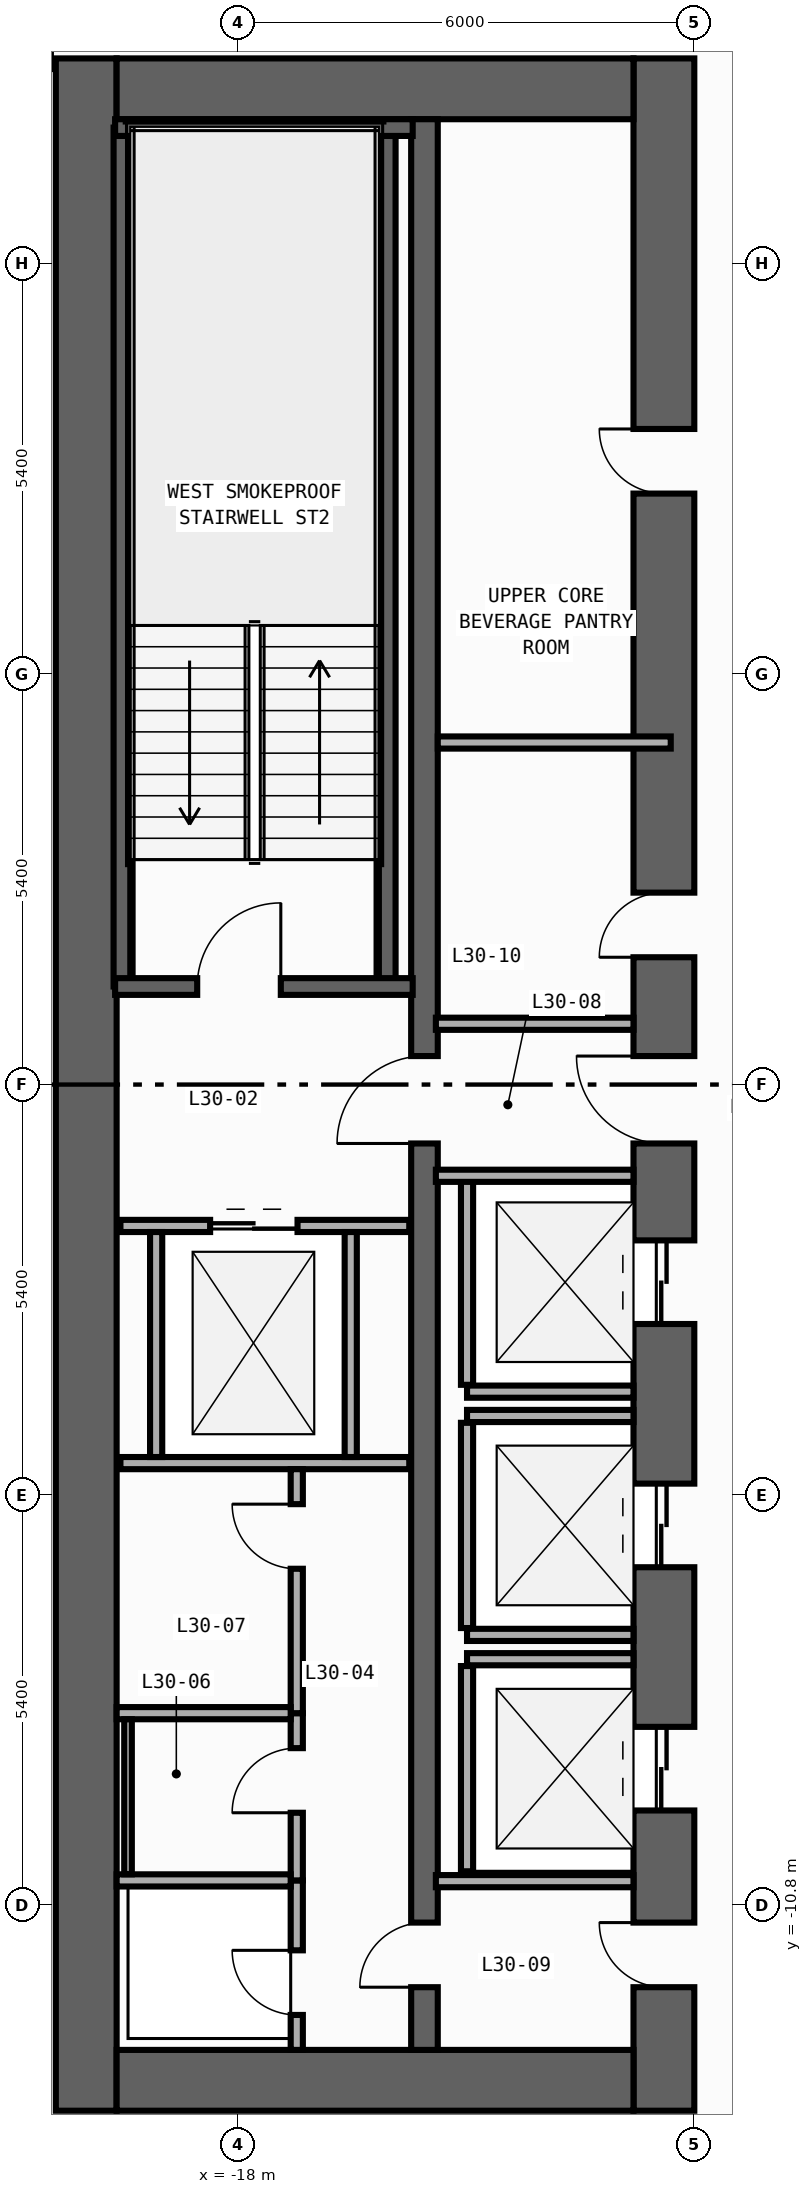
"""IFC4 building model, lengths in metres.
Left out: names, types, materials, properties, quantities, classifications, styles, units other than length and angle.
Written with IfcOpenShell. Run it as: python <this file> out.ifc"""

import sys

from ifc_helpers import new_model, si_unit, direction, frame, frame_2d, origin, place, context, subcontext, project, spatial, rectangle, extrude, element, fill, save


model = new_model("IFC4")
c1 = context("Model", 3, precision=1e-05, world=origin(), true_north=direction((0.0, 1.0)))
c2 = subcontext(c1, "Body", "Model", "MODEL_VIEW")
j1 = project(units=[si_unit("LENGTHUNIT", "METRE"), si_unit("PLANEANGLEUNIT", "RADIAN")], contexts=[c1])
p1 = place(None, origin())
s1 = spatial("IfcSite", under=j1, at=p1, CompositionType="ELEMENT")
p2 = place(p1, origin())
s2 = spatial("IfcBuilding", under=s1, at=p2, CompositionType="ELEMENT")
p3 = place(p2, frame((0.0, 0.0, 131.0)))
s3 = spatial("IfcBuildingStorey", under=s2, at=p3, CompositionType="ELEMENT", Elevation=131.0)
p4 = place(p3, frame((-20.0, -13.5, 0.0), z_axis=(0.0, 0.0, 1.0), x_axis=(0.0, 1.0, 0.0)))
e1 = element("IfcWall", 1, at=p4, inside=s3, PredefinedType="SHEAR", context=c2, shape_type="SweptSolid", body=[
    extrude(rectangle(XDim=27.0, YDim=0.8, at=frame_2d((13.5, 0.0))), origin(), (0.0, 0.0, 1.0), 3.94),
])
p5 = place(p3, frame((-12.4, -13.5, 0.0), z_axis=(0.0, 0.0, 1.0), x_axis=(0.0, 1.0, 0.0)))
e2 = element("IfcWall", 2, at=p5, inside=s3, PredefinedType="SHEAR", context=c2, shape_type="SweptSolid", body=[
    extrude(rectangle(XDim=27.0, YDim=0.8, at=frame_2d((13.5, 0.0))), origin(), (0.0, 0.0, 1.0), 3.94),
])
p6 = place(p5, frame((10.35, 0.0, 0.0)))
e3 = element("IfcOpeningElement", 3, at=p6, cuts=e2, PredefinedType="OPENING", context=c2, shape_type="SweptSolid", body=[
    extrude(rectangle(XDim=1.1, YDim=2.2, at=frame_2d((0.55, 1.1))), frame((0.0, 0.41, 0.0), z_axis=(0.0, -1.0, 0.0), x_axis=(1.0, 0.0, 0.0)), (0.0, 0.0, 1.0), 0.82),
])
p7 = place(p5, frame((7.15, 0.0, 0.0)))
e4 = element("IfcOpeningElement", 4, at=p7, cuts=e2, PredefinedType="OPENING", context=c2, shape_type="SweptSolid", body=[
    extrude(rectangle(XDim=1.1, YDim=2.2, at=frame_2d((0.55, 1.1))), frame((0.0, 0.41, 0.0), z_axis=(0.0, -1.0, 0.0), x_axis=(1.0, 0.0, 0.0)), (0.0, 0.0, 1.0), 0.82),
])
p8 = place(p5, frame((3.95, 0.0, 0.0)))
e5 = element("IfcOpeningElement", 5, at=p8, cuts=e2, PredefinedType="OPENING", context=c2, shape_type="SweptSolid", body=[
    extrude(rectangle(XDim=1.1, YDim=2.2, at=frame_2d((0.55, 1.1))), frame((0.0, 0.41, 0.0), z_axis=(0.0, -1.0, 0.0), x_axis=(1.0, 0.0, 0.0)), (0.0, 0.0, 1.0), 0.82),
])
p9 = place(p5, frame((15.175, 0.0, 0.0)))
e6 = element("IfcOpeningElement", 6, at=p9, cuts=e2, PredefinedType="OPENING", context=c2, shape_type="SweptSolid", body=[
    extrude(rectangle(XDim=0.85, YDim=2.1, at=frame_2d((0.425, 1.05))), frame((0.0, 0.41, 0.0), z_axis=(0.0, -1.0, 0.0), x_axis=(1.0, 0.0, 0.0)), (0.0, 0.0, 1.0), 0.82),
])
p10 = place(p5, frame((21.275, 0.0, 0.0)))
e7 = element("IfcOpeningElement", 7, at=p10, cuts=e2, PredefinedType="OPENING", context=c2, shape_type="SweptSolid", body=[
    extrude(rectangle(XDim=0.85, YDim=2.1, at=frame_2d((0.425, 1.05))), frame((0.0, 0.41, 0.0), z_axis=(0.0, -1.0, 0.0), x_axis=(1.0, 0.0, 0.0)), (0.0, 0.0, 1.0), 0.82),
])
p11 = place(p5, frame((12.725, 0.0, 0.0)))
e8 = element("IfcOpeningElement", 8, at=p11, cuts=e2, PredefinedType="OPENING", context=c2, shape_type="SweptSolid", body=[
    extrude(rectangle(XDim=1.15, YDim=2.2, at=frame_2d((0.575, 1.1))), frame((0.0, 0.41, 0.0), z_axis=(0.0, -1.0, 0.0), x_axis=(1.0, 0.0, 0.0)), (0.0, 0.0, 1.0), 0.82),
])
p12 = place(p5, frame((1.625, 0.0, 0.0)))
e9 = element("IfcOpeningElement", 9, at=p12, cuts=e2, PredefinedType="OPENING", context=c2, shape_type="SweptSolid", body=[
    extrude(rectangle(XDim=0.85, YDim=2.1, at=frame_2d((0.425, 1.05))), frame((0.0, 0.41, 0.0), z_axis=(0.0, -1.0, 0.0), x_axis=(1.0, 0.0, 0.0)), (0.0, 0.0, 1.0), 0.82),
])
for number, where, z_axis, x_axis in (
    (10, (-19.6, -13.1, 0.0), (0.0, 0.0, 1.0), (1.0, 0.0, 0.0)),
    (11, (-19.6, 13.1, 0.0), (0.0, 0.0, 1.0), (1.0, 0.0, 0.0)),
):
    element("IfcWall", number, at=place(p3, frame(where, z_axis=z_axis, x_axis=x_axis)), inside=s3, PredefinedType="SHEAR", context=c2, shape_type="SweptSolid", body=[
        extrude(rectangle(XDim=6.8, YDim=0.8, at=frame_2d((3.4, 0.0))), origin(), (0.0, 0.0, 1.0), 3.94),
    ])
p13 = place(p3, frame((-15.55, -12.7, 0.0), z_axis=(0.0, 0.0, 1.0), x_axis=(0.0, 1.0, 0.0)))
e12 = element("IfcWall", 12, at=p13, inside=s3, PredefinedType="SHEAR", context=c2, shape_type="SweptSolid", body=[
    extrude(rectangle(XDim=25.4, YDim=0.35, at=frame_2d((12.7, 0.0))), origin(), (0.0, 0.0, 1.0), 3.94),
])
p14 = place(p13, frame((11.925, 0.0, 0.0)))
e13 = element("IfcOpeningElement", 13, at=p14, cuts=e12, PredefinedType="OPENING", context=c2, shape_type="SweptSolid", body=[
    extrude(rectangle(XDim=1.15, YDim=2.2, at=frame_2d((0.575, 1.1))), frame((0.0, 0.185, 0.0), z_axis=(0.0, -1.0, 0.0), x_axis=(1.0, 0.0, 0.0)), (0.0, 0.0, 1.0), 0.37),
])
p15 = place(p13, frame((0.825, 0.0, 0.0)))
e14 = element("IfcOpeningElement", 14, at=p15, cuts=e12, PredefinedType="OPENING", context=c2, shape_type="SweptSolid", body=[
    extrude(rectangle(XDim=0.85, YDim=2.1, at=frame_2d((0.425, 1.05))), frame((0.0, 0.185, 0.0), z_axis=(0.0, -1.0, 0.0), x_axis=(1.0, 0.0, 0.0)), (0.0, 0.0, 1.0), 0.37),
])
for number, where, z_axis, x_axis in (
    (15, (-16.04, 1.29, 0.0), (0.0, 0.0, 1.0), (0.0, 1.0, 0.0)),
    (16, (-19.53, 1.29, 0.0), (0.0, 0.0, 1.0), (0.0, 1.0, 0.0)),
):
    element("IfcWall", number, at=place(p3, frame(where, z_axis=z_axis, x_axis=x_axis)), inside=s3, PredefinedType="SHEAR", context=c2, shape_type="SweptSolid", body=[
        extrude(rectangle(XDim=11.3, YDim=0.22, at=frame_2d((5.65, 0.0))), origin(), (0.0, 0.0, 1.0), 3.94),
    ])
p16 = place(p3, frame((-19.62, 12.59, 0.0), z_axis=(0.0, 0.0, 1.0), x_axis=(1.0, 0.0, 0.0)))
e17 = element("IfcWall", 17, at=p16, inside=s3, PredefinedType="SHEAR", context=c2, shape_type="SweptSolid", body=[
    extrude(rectangle(XDim=3.915, YDim=0.22, at=frame_2d((1.958, 0.0))), origin(), (0.0, 0.0, 1.0), 3.94),
])
p17 = place(p3, frame((-19.62, 1.29, 0.0), z_axis=(0.0, 0.0, 1.0), x_axis=(1.0, 0.0, 0.0)))
e18 = element("IfcWall", 18, at=p17, inside=s3, PredefinedType="SHEAR", context=c2, shape_type="SweptSolid", body=[
    extrude(rectangle(XDim=3.915, YDim=0.22, at=frame_2d((1.958, 0.0))), origin(), (0.0, 0.0, 1.0), 3.94),
])
p18 = place(p17, frame((1.08, 0.0, 0.0)))
e19 = element("IfcOpeningElement", 19, at=p18, cuts=e18, PredefinedType="OPENING", context=c2, shape_type="SweptSolid", body=[
    extrude(rectangle(XDim=1.1, YDim=2.2, at=frame_2d((0.55, 1.1))), frame((0.0, 0.12, 0.0), z_axis=(0.0, -1.0, 0.0), x_axis=(1.0, 0.0, 0.0)), (0.0, 0.0, 1.0), 0.24),
])
p19 = place(p3, frame((-14.99, -4.04, 0.0), z_axis=(0.0, 0.0, 1.0), x_axis=(1.0, 0.0, 0.0)))
e20 = element("IfcWall", 20, at=p19, inside=s3, PredefinedType="STANDARD", context=c2, shape_type="SweptSolid", body=[
    extrude(rectangle(XDim=2.19, YDim=0.16, at=frame_2d((1.095, 0.0))), origin(), (0.0, 0.0, 1.0), 3.94),
])
p20 = place(p3, frame((-14.99, -3.95, 0.0), z_axis=(0.0, 0.0, 1.0), x_axis=(0.0, 1.0, 0.0)))
e21 = element("IfcWall", 21, at=p20, inside=s3, PredefinedType="STANDARD", context=c2, shape_type="SweptSolid", body=[
    extrude(rectangle(XDim=2.7, YDim=0.16, at=frame_2d((1.35, 0.0))), origin(), (0.0, 0.0, 1.0), 3.94),
])
for number, where, z_axis, x_axis in (
    (22, (-14.99, -7.24, 0.0), (0.0, 0.0, 1.0), (1.0, 0.0, 0.0)),
    (23, (-14.99, -4.36, 0.0), (0.0, 0.0, 1.0), (1.0, 0.0, 0.0)),
):
    element("IfcWall", number, at=place(p3, frame(where, z_axis=z_axis, x_axis=x_axis)), inside=s3, PredefinedType="STANDARD", context=c2, shape_type="SweptSolid", body=[
        extrude(rectangle(XDim=2.19, YDim=0.16, at=frame_2d((1.095, 0.0))), origin(), (0.0, 0.0, 1.0), 3.94),
    ])
p21 = place(p3, frame((-14.99, -7.15, 0.0), z_axis=(0.0, 0.0, 1.0), x_axis=(0.0, 1.0, 0.0)))
e24 = element("IfcWall", 24, at=p21, inside=s3, PredefinedType="STANDARD", context=c2, shape_type="SweptSolid", body=[
    extrude(rectangle(XDim=2.7, YDim=0.16, at=frame_2d((1.35, 0.0))), origin(), (0.0, 0.0, 1.0), 3.94),
])
p22 = place(p3, frame((-14.99, -7.56, 0.0), z_axis=(0.0, 0.0, 1.0), x_axis=(1.0, 0.0, 0.0)))
e25 = element("IfcWall", 25, at=p22, inside=s3, PredefinedType="STANDARD", context=c2, shape_type="SweptSolid", body=[
    extrude(rectangle(XDim=2.19, YDim=0.16, at=frame_2d((1.095, 0.0))), origin(), (0.0, 0.0, 1.0), 3.94),
])
p23 = place(p3, frame((-14.99, -10.35, 0.0), z_axis=(0.0, 0.0, 1.0), x_axis=(0.0, 1.0, 0.0)))
e26 = element("IfcWall", 26, at=p23, inside=s3, PredefinedType="STANDARD", context=c2, shape_type="SweptSolid", body=[
    extrude(rectangle(XDim=2.7, YDim=0.16, at=frame_2d((1.35, 0.0))), origin(), (0.0, 0.0, 1.0), 3.94),
])
p24 = place(p3, frame((-19.55, -1.86, 0.0), z_axis=(0.0, 0.0, 1.0), x_axis=(1.0, 0.0, 0.0)))
e27 = element("IfcWall", 27, at=p24, inside=s3, PredefinedType="STANDARD", context=c2, shape_type="SweptSolid", body=[
    extrude(rectangle(XDim=3.8, YDim=0.16, at=frame_2d((1.9, 0.0))), origin(), (0.0, 0.0, 1.0), 3.94),
])
p25 = place(p24, frame((1.18, 0.0, 0.0)))
e28 = element("IfcOpeningElement", 28, at=p25, cuts=e27, PredefinedType="OPENING", context=c2, shape_type="SweptSolid", body=[
    extrude(rectangle(XDim=1.15, YDim=2.2, at=frame_2d((0.575, 1.1))), frame((0.0, 0.09, 0.0), z_axis=(0.0, -1.0, 0.0), x_axis=(1.0, 0.0, 0.0)), (0.0, 0.0, 1.0), 0.18),
])
p26 = place(p3, frame((-19.55, -4.98, 0.0), z_axis=(0.0, 0.0, 1.0), x_axis=(1.0, 0.0, 0.0)))
e29 = element("IfcWall", 29, at=p26, inside=s3, PredefinedType="STANDARD", context=c2, shape_type="SweptSolid", body=[
    extrude(rectangle(XDim=3.8, YDim=0.16, at=frame_2d((1.9, 0.0))), origin(), (0.0, 0.0, 1.0), 3.94),
])
for number, where, z_axis, x_axis in (
    (30, (-19.08, -4.9, 0.0), (0.0, 0.0, 1.0), (0.0, 1.0, 0.0)),
    (31, (-16.52, -4.9, 0.0), (0.0, 0.0, 1.0), (0.0, 1.0, 0.0)),
):
    element("IfcWall", number, at=place(p3, frame(where, z_axis=z_axis, x_axis=x_axis)), inside=s3, PredefinedType="STANDARD", context=c2, shape_type="SweptSolid", body=[
        extrude(rectangle(XDim=2.96, YDim=0.16, at=frame_2d((1.48, 0.0))), origin(), (0.0, 0.0, 1.0), 3.94),
    ])
for number, where, z_axis, x_axis in (
    (32, (-15.4, 0.8, 0.0), (0.0, 0.0, 1.0), (1.0, 0.0, 0.0)),
    (33, (-15.4, -1.2, 0.0), (0.0, 0.0, 1.0), (1.0, 0.0, 0.0)),
    (34, (-15.4, -10.48, 0.0), (0.0, 0.0, 1.0), (1.0, 0.0, 0.0)),
):
    element("IfcWall", number, at=place(p3, frame(where, z_axis=z_axis, x_axis=x_axis)), inside=s3, PredefinedType="STANDARD", context=c2, shape_type="SweptSolid", body=[
        extrude(rectangle(XDim=2.6, YDim=0.16, at=frame_2d((1.3, 0.0))), origin(), (0.0, 0.0, 1.0), 3.94),
    ])
p27 = place(p3, frame((-17.23, -12.7, 0.0), z_axis=(0.0, 0.0, 1.0), x_axis=(0.0, 1.0, 0.0)))
e35 = element("IfcWall", 35, at=p27, inside=s3, PredefinedType="PARTITIONING", context=c2, shape_type="SweptSolid", body=[
    extrude(rectangle(XDim=2.23, YDim=0.16, at=frame_2d((1.115, 0.0))), origin(), (0.0, 0.0, 1.0), 3.94),
])
p28 = place(p27, frame((0.46, 0.0, 0.0)))
e36 = element("IfcOpeningElement", 36, at=p28, cuts=e35, PredefinedType="OPENING", context=c2, shape_type="SweptSolid", body=[
    extrude(rectangle(XDim=0.85, YDim=2.1, at=frame_2d((0.425, 1.05))), frame((0.0, 0.09, 0.0), z_axis=(0.0, -1.0, 0.0), x_axis=(1.0, 0.0, 0.0)), (0.0, 0.0, 1.0), 0.18),
])
p29 = place(p3, frame((-17.23, -10.47, 0.0), z_axis=(0.0, 0.0, 1.0), x_axis=(0.0, 1.0, 0.0)))
e37 = element("IfcWall", 37, at=p29, inside=s3, PredefinedType="PARTITIONING", context=c2, shape_type="SweptSolid", body=[
    extrude(rectangle(XDim=2.2, YDim=0.16, at=frame_2d((1.1, 0.0))), origin(), (0.0, 0.0, 1.0), 3.94),
])
p30 = place(p29, frame((0.89, 0.0, 0.0)))
e38 = element("IfcOpeningElement", 38, at=p30, cuts=e37, PredefinedType="OPENING", context=c2, shape_type="SweptSolid", body=[
    extrude(rectangle(XDim=0.85, YDim=2.1, at=frame_2d((0.425, 1.05))), frame((0.0, 0.09, 0.0), z_axis=(0.0, -1.0, 0.0), x_axis=(1.0, 0.0, 0.0)), (0.0, 0.0, 1.0), 0.18),
])
p31 = place(p3, frame((-17.23, -8.27, 0.0), z_axis=(0.0, 0.0, 1.0), x_axis=(0.0, 1.0, 0.0)))
e39 = element("IfcWall", 39, at=p31, inside=s3, PredefinedType="PARTITIONING", context=c2, shape_type="SweptSolid", body=[
    extrude(rectangle(XDim=3.21, YDim=0.16, at=frame_2d((1.605, 0.0))), origin(), (0.0, 0.0, 1.0), 3.94),
])
p32 = place(p31, frame((1.9, 0.0, 0.0)))
e40 = element("IfcOpeningElement", 40, at=p32, cuts=e39, PredefinedType="OPENING", context=c2, shape_type="SweptSolid", body=[
    extrude(rectangle(XDim=0.85, YDim=2.1, at=frame_2d((0.425, 1.05))), frame((0.0, 0.09, 0.0), z_axis=(0.0, -1.0, 0.0), x_axis=(1.0, 0.0, 0.0)), (0.0, 0.0, 1.0), 0.18),
])
for number, where, z_axis, x_axis in (
    (41, (-19.6, -10.47, 0.0), (0.0, 0.0, 1.0), (1.0, 0.0, 0.0)),
    (42, (-19.6, -8.27, 0.0), (0.0, 0.0, 1.0), (1.0, 0.0, 0.0)),
):
    element("IfcWall", number, at=place(p3, frame(where, z_axis=z_axis, x_axis=x_axis)), inside=s3, PredefinedType="PARTITIONING", context=c2, shape_type="SweptSolid", body=[
        extrude(rectangle(XDim=2.29, YDim=0.16, at=frame_2d((1.145, 0.0))), origin(), (0.0, 0.0, 1.0), 3.94),
    ])
p33 = place(p3, frame((-15.375, 4.5, 0.0), z_axis=(0.0, 0.0, 1.0), x_axis=(1.0, 0.0, 0.0)))
e43 = element("IfcWall", 43, at=p33, inside=s3, PredefinedType="PARTITIONING", context=c2, shape_type="SweptSolid", body=[
    extrude(rectangle(XDim=3.065, YDim=0.16, at=frame_2d((1.532, 0.0))), origin(), (0.0, 0.0, 1.0), 3.94),
])
p34 = place(p3, frame((-19.45, -10.39, 0.0), z_axis=(0.0, 0.0, 1.0), x_axis=(0.0, 1.0, 0.0)))
e44 = element("IfcWall", 44, at=p34, inside=s3, PredefinedType="PARTITIONING", context=c2, shape_type="SweptSolid", body=[
    extrude(rectangle(XDim=2.04, YDim=0.1, at=frame_2d((1.02, 0.0))), origin(), (0.0, 0.0, 1.0), 3.94),
])
p35 = place(p18, origin())
e45 = element("IfcDoor", 45, at=p35, inside=s3, OperationType="SINGLE_SWING_RIGHT", PredefinedType="DOOR", context=c2, shape_type="SweptSolid", body=[
    extrude(rectangle(XDim=1.1, YDim=2.2, at=frame_2d((0.55, 1.1))), frame((0.0, 0.025, 0.0), z_axis=(0.0, -1.0, 0.0), x_axis=(1.0, 0.0, 0.0)), (0.0, 0.0, 1.0), 0.05),
])
fill(e19, e45)
p36 = place(p6, origin())
e46 = element("IfcDoor", 46, at=p36, inside=s3, OperationType="DOUBLE_DOOR_SLIDING", PredefinedType="DOOR", context=c2, shape_type="SweptSolid", body=[
    extrude(rectangle(XDim=1.1, YDim=2.2, at=frame_2d((0.55, 1.1))), frame((0.0, 0.025, 0.0), z_axis=(0.0, -1.0, 0.0), x_axis=(1.0, 0.0, 0.0)), (0.0, 0.0, 1.0), 0.05),
])
fill(e3, e46)
p37 = place(p7, origin())
e47 = element("IfcDoor", 47, at=p37, inside=s3, OperationType="DOUBLE_DOOR_SLIDING", PredefinedType="DOOR", context=c2, shape_type="SweptSolid", body=[
    extrude(rectangle(XDim=1.1, YDim=2.2, at=frame_2d((0.55, 1.1))), frame((0.0, 0.025, 0.0), z_axis=(0.0, -1.0, 0.0), x_axis=(1.0, 0.0, 0.0)), (0.0, 0.0, 1.0), 0.05),
])
fill(e4, e47)
p38 = place(p8, origin())
e48 = element("IfcDoor", 48, at=p38, inside=s3, OperationType="DOUBLE_DOOR_SLIDING", PredefinedType="DOOR", context=c2, shape_type="SweptSolid", body=[
    extrude(rectangle(XDim=1.1, YDim=2.2, at=frame_2d((0.55, 1.1))), frame((0.0, 0.025, 0.0), z_axis=(0.0, -1.0, 0.0), x_axis=(1.0, 0.0, 0.0)), (0.0, 0.0, 1.0), 0.05),
])
fill(e5, e48)
p39 = place(p9, origin())
e49 = element("IfcDoor", 49, at=p39, inside=s3, OperationType="SINGLE_SWING_LEFT", PredefinedType="DOOR", context=c2, shape_type="SweptSolid", body=[
    extrude(rectangle(XDim=0.85, YDim=2.1, at=frame_2d((0.425, 1.05))), frame((0.0, 0.025, 0.0), z_axis=(0.0, -1.0, 0.0), x_axis=(1.0, 0.0, 0.0)), (0.0, 0.0, 1.0), 0.05),
])
fill(e6, e49)
p40 = place(p10, origin())
e50 = element("IfcDoor", 50, at=p40, inside=s3, OperationType="SINGLE_SWING_RIGHT", PredefinedType="DOOR", context=c2, shape_type="SweptSolid", body=[
    extrude(rectangle(XDim=0.85, YDim=2.1, at=frame_2d((0.425, 1.05))), frame((0.0, 0.025, 0.0), z_axis=(0.0, -1.0, 0.0), x_axis=(1.0, 0.0, 0.0)), (0.0, 0.0, 1.0), 0.05),
])
fill(e7, e50)
p41 = place(p11, origin())
e51 = element("IfcDoor", 51, at=p41, inside=s3, OperationType="SINGLE_SWING_RIGHT", PredefinedType="DOOR", context=c2, shape_type="SweptSolid", body=[
    extrude(rectangle(XDim=1.15, YDim=2.2, at=frame_2d((0.575, 1.1))), frame((0.0, 0.025, 0.0), z_axis=(0.0, -1.0, 0.0), x_axis=(1.0, 0.0, 0.0)), (0.0, 0.0, 1.0), 0.05),
])
fill(e8, e51)
p42 = place(p14, origin())
e52 = element("IfcDoor", 52, at=p42, inside=s3, OperationType="SINGLE_SWING_LEFT", PredefinedType="DOOR", context=c2, shape_type="SweptSolid", body=[
    extrude(rectangle(XDim=1.15, YDim=2.2, at=frame_2d((0.575, 1.1))), frame((0.0, 0.025, 0.0), z_axis=(0.0, -1.0, 0.0), x_axis=(1.0, 0.0, 0.0)), (0.0, 0.0, 1.0), 0.05),
])
fill(e13, e52)
p43 = place(p12, origin())
e53 = element("IfcDoor", 53, at=p43, inside=s3, OperationType="SINGLE_SWING_RIGHT", PredefinedType="DOOR", context=c2, shape_type="SweptSolid", body=[
    extrude(rectangle(XDim=0.85, YDim=2.1, at=frame_2d((0.425, 1.05))), frame((0.0, 0.025, 0.0), z_axis=(0.0, -1.0, 0.0), x_axis=(1.0, 0.0, 0.0)), (0.0, 0.0, 1.0), 0.05),
])
fill(e9, e53)
p44 = place(p15, origin())
e54 = element("IfcDoor", 54, at=p44, inside=s3, OperationType="SINGLE_SWING_LEFT", PredefinedType="DOOR", context=c2, shape_type="SweptSolid", body=[
    extrude(rectangle(XDim=0.85, YDim=2.1, at=frame_2d((0.425, 1.05))), frame((0.0, 0.025, 0.0), z_axis=(0.0, -1.0, 0.0), x_axis=(1.0, 0.0, 0.0)), (0.0, 0.0, 1.0), 0.05),
])
fill(e14, e54)
p45 = place(p25, origin())
e55 = element("IfcDoor", 55, at=p45, inside=s3, OperationType="DOUBLE_DOOR_SLIDING", PredefinedType="DOOR", context=c2, shape_type="SweptSolid", body=[
    extrude(rectangle(XDim=1.15, YDim=2.2, at=frame_2d((0.575, 1.1))), frame((0.0, 0.025, 0.0), z_axis=(0.0, -1.0, 0.0), x_axis=(1.0, 0.0, 0.0)), (0.0, 0.0, 1.0), 0.05),
])
fill(e28, e55)
p46 = place(p28, origin())
e56 = element("IfcDoor", 56, at=p46, inside=s3, OperationType="SINGLE_SWING_RIGHT", PredefinedType="DOOR", context=c2, shape_type="SweptSolid", body=[
    extrude(rectangle(XDim=0.85, YDim=2.1, at=frame_2d((0.425, 1.05))), frame((0.0, 0.025, 0.0), z_axis=(0.0, -1.0, 0.0), x_axis=(1.0, 0.0, 0.0)), (0.0, 0.0, 1.0), 0.05),
])
fill(e36, e56)
p47 = place(p30, origin())
e57 = element("IfcDoor", 57, at=p47, inside=s3, OperationType="SINGLE_SWING_LEFT", PredefinedType="DOOR", context=c2, shape_type="SweptSolid", body=[
    extrude(rectangle(XDim=0.85, YDim=2.1, at=frame_2d((0.425, 1.05))), frame((0.0, 0.025, 0.0), z_axis=(0.0, -1.0, 0.0), x_axis=(1.0, 0.0, 0.0)), (0.0, 0.0, 1.0), 0.05),
])
fill(e38, e57)
p48 = place(p32, origin())
e58 = element("IfcDoor", 58, at=p48, inside=s3, OperationType="SINGLE_SWING_RIGHT", PredefinedType="DOOR", context=c2, shape_type="SweptSolid", body=[
    extrude(rectangle(XDim=0.85, YDim=2.1, at=frame_2d((0.425, 1.05))), frame((0.0, 0.025, 0.0), z_axis=(0.0, -1.0, 0.0), x_axis=(1.0, 0.0, 0.0)), (0.0, 0.0, 1.0), 0.05),
])
fill(e40, e58)
save(model, sys.argv[1])
